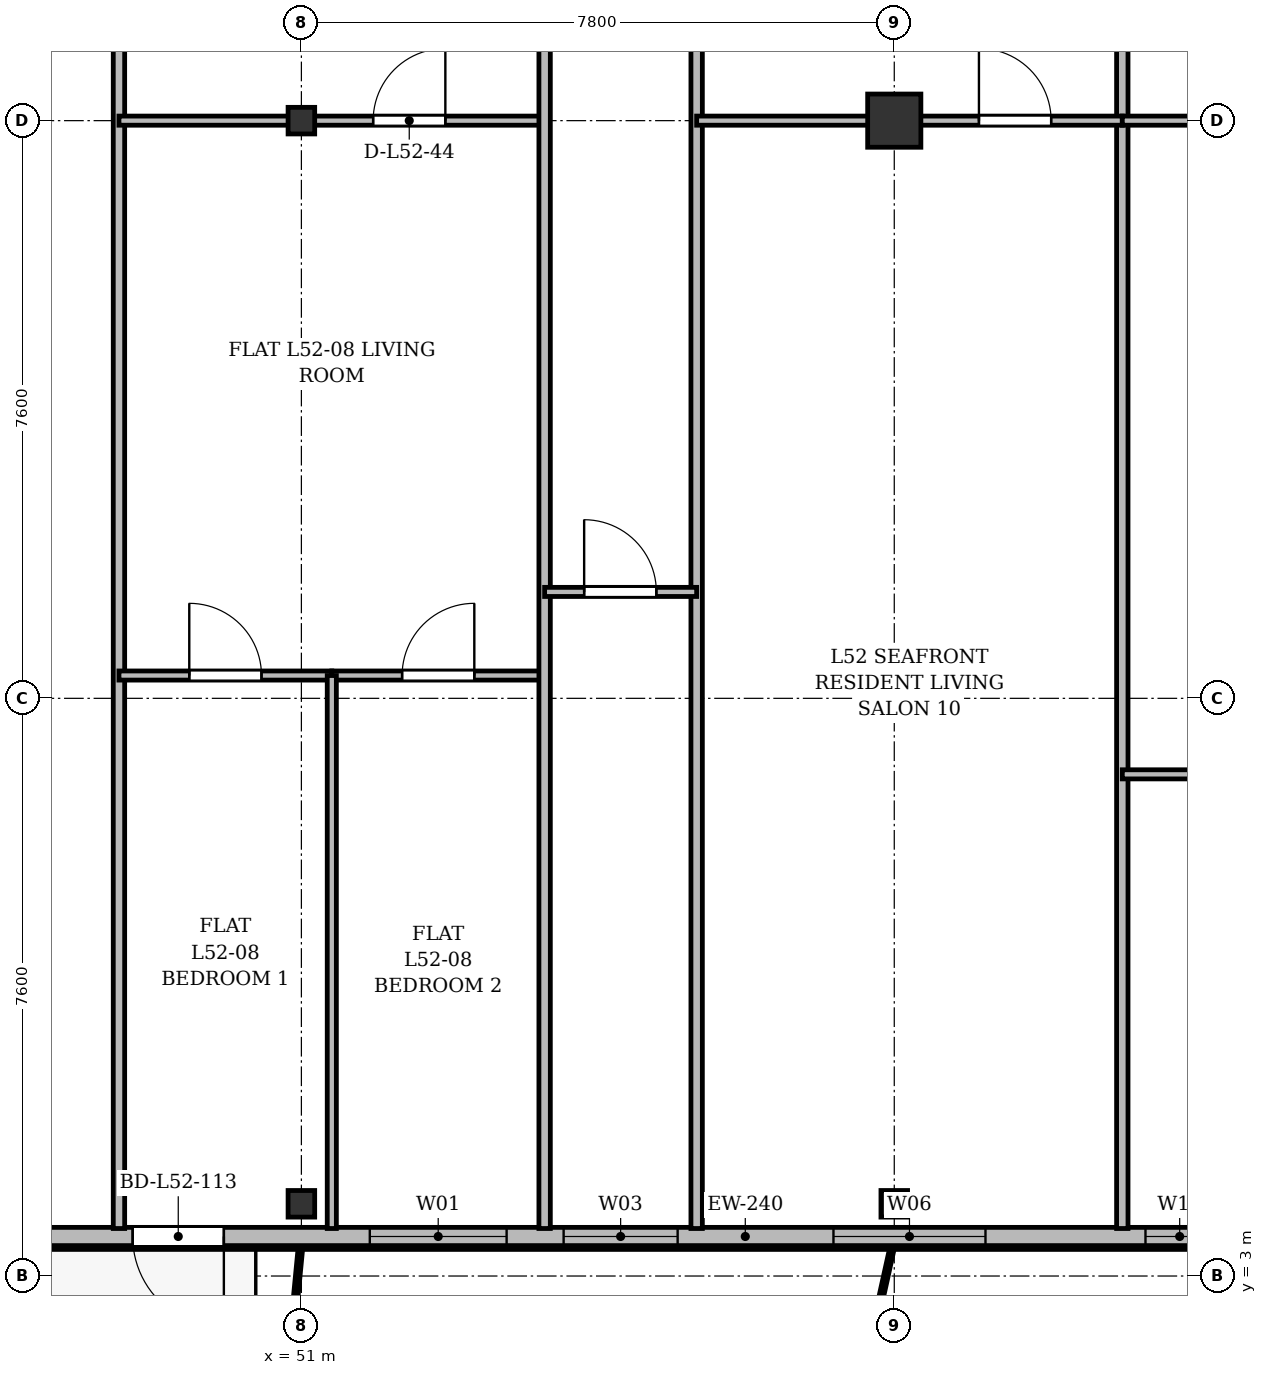
"""IFC4 building model, lengths in metres.
Left out: names, types, materials, properties, quantities, classifications, styles, units other than length and angle.
Written with IfcOpenShell. Run it as: python <this file> out.ifc"""

import sys

from ifc_helpers import new_model, si_unit, direction, frame, frame_2d, origin, origin_2d, place, context, subcontext, project, spatial, rectangle, i_section, extrude, source, transform, mapped, element, fill, save


model = new_model("IFC4")
c1 = context("Model", 3, precision=1e-05, world=origin(), true_north=direction((0.0, 1.0)))
c2 = subcontext(c1, "Body", "Model", "MODEL_VIEW")
j1 = project(units=[si_unit("LENGTHUNIT", "METRE"), si_unit("PLANEANGLEUNIT", "RADIAN")], contexts=[c1])
p1 = place(None, origin())
s1 = spatial("IfcSite", under=j1, at=p1, CompositionType="ELEMENT")
p2 = place(p1, origin())
s2 = spatial("IfcBuilding", under=s1, at=p2, CompositionType="ELEMENT")
p3 = place(p2, frame((0.0, 0.0, 201.3)))
s3 = spatial("IfcBuildingStorey", under=s2, at=p3, CompositionType="ELEMENT", Elevation=201.3)
m1 = source(origin(), c2, "Body", "SweptSolid", [
    extrude(i_section(OverallWidth=0.35, OverallDepth=0.35, WebThickness=0.018, FlangeThickness=0.028, at=origin_2d()), origin(), (0.0, 0.0, 1.0), 3.6),
])
for number, where, z_axis, x_axis in (
    (1, (51.0, 3.95, 0.0), (0.0, 0.0, 1.0), (1.0, 0.0, 0.0)),
    (2, (51.0, 18.2, 0.0), (0.0, 0.0, 1.0), (1.0, 0.0, 0.0)),
    (3, (58.8, 3.95, 0.0), (0.0, 0.0, 1.0), (1.0, 0.0, 0.0)),
):
    element("IfcColumn", number, at=place(p3, frame(where, z_axis=z_axis, x_axis=x_axis)), inside=s3, PredefinedType="COLUMN", context=c2, shape_type="MappedRepresentation", body=[
        mapped(m1, transform((0.0, 0.0, 0.0), x_axis=(1.0, 0.0, 0.0), y_axis=(0.0, 1.0, 0.0), z_axis=(0.0, 0.0, 1.0), scale=1.0)),
    ])
m2 = source(origin(), c2, "Body", "SweptSolid", [
    extrude(rectangle(XDim=0.7, YDim=0.7, at=origin_2d()), origin(), (0.0, 0.0, 1.0), 3.6),
])
p4 = place(p3, frame((58.8, 18.2, 0.0), z_axis=(0.0, 0.0, 1.0), x_axis=(1.0, 0.0, 0.0)))
e4 = element("IfcColumn", 4, at=p4, inside=s3, PredefinedType="COLUMN", context=c2, shape_type="MappedRepresentation", body=[
    mapped(m2, transform((0.0, 0.0, 0.0), x_axis=(1.0, 0.0, 0.0), y_axis=(0.0, 1.0, 0.0), z_axis=(0.0, 0.0, 1.0), scale=1.0)),
])
p5 = place(p3, frame((63.4, 3.52, 0.0), z_axis=(0.0, 0.0, 1.0), x_axis=(-1.0, 0.0, 0.0)))
e5 = element("IfcWall", 5, at=p5, inside=s3, PredefinedType="SOLIDWALL", context=c2, shape_type="SweptSolid", body=[
    extrude(rectangle(XDim=19.6, YDim=0.24, at=frame_2d((9.8, 0.0))), origin(), (0.0, 0.0, 1.0), 3.22),
])
p6 = place(p5, frame((0.395, 0.0, 0.9)))
e6 = element("IfcOpeningElement", 6, at=p6, cuts=e5, PredefinedType="OPENING", context=c2, shape_type="SweptSolid", body=[
    extrude(rectangle(XDim=0.9, YDim=1.65, at=frame_2d((0.45, 0.825))), frame((0.0, 0.13, 0.0), z_axis=(0.0, -1.0, 0.0), x_axis=(1.0, 0.0, 0.0)), (0.0, 0.0, 1.0), 0.26),
])
p7 = place(p5, frame((3.4, 0.0, 0.9)))
e7 = element("IfcOpeningElement", 7, at=p7, cuts=e5, PredefinedType="OPENING", context=c2, shape_type="SweptSolid", body=[
    extrude(rectangle(XDim=2.0, YDim=1.95, at=frame_2d((1.0, 0.975))), frame((0.0, 0.13, 0.0), z_axis=(0.0, -1.0, 0.0), x_axis=(1.0, 0.0, 0.0)), (0.0, 0.0, 1.0), 0.26),
])
p8 = place(p5, frame((7.45, 0.0, 0.9)))
e8 = element("IfcOpeningElement", 8, at=p8, cuts=e5, PredefinedType="OPENING", context=c2, shape_type="SweptSolid", body=[
    extrude(rectangle(XDim=1.5, YDim=1.75, at=frame_2d((0.75, 0.875))), frame((0.0, 0.13, 0.0), z_axis=(0.0, -1.0, 0.0), x_axis=(1.0, 0.0, 0.0)), (0.0, 0.0, 1.0), 0.26),
])
p9 = place(p5, frame((9.7, 0.0, 0.9)))
e9 = element("IfcOpeningElement", 9, at=p9, cuts=e5, PredefinedType="OPENING", context=c2, shape_type="SweptSolid", body=[
    extrude(rectangle(XDim=1.8, YDim=1.8, at=frame_2d((0.9, 0.9))), frame((0.0, 0.13, 0.0), z_axis=(0.0, -1.0, 0.0), x_axis=(1.0, 0.0, 0.0)), (0.0, 0.0, 1.0), 0.26),
])
p10 = place(p5, frame((13.42, 0.0, 0.0)))
e10 = element("IfcOpeningElement", 10, at=p10, cuts=e5, PredefinedType="OPENING", context=c2, shape_type="SweptSolid", body=[
    extrude(rectangle(XDim=1.2, YDim=2.2, at=frame_2d((0.6, 1.1))), frame((0.0, 0.13, 0.0), z_axis=(0.0, -1.0, 0.0), x_axis=(1.0, 0.0, 0.0)), (0.0, 0.0, 1.0), 0.26),
])
p11 = place(p5, frame((16.405, 0.0, 0.9)))
e11 = element("IfcOpeningElement", 11, at=p11, cuts=e5, PredefinedType="OPENING", context=c2, shape_type="SweptSolid", body=[
    extrude(rectangle(XDim=1.5, YDim=1.75, at=frame_2d((0.75, 0.875))), frame((0.0, 0.13, 0.0), z_axis=(0.0, -1.0, 0.0), x_axis=(1.0, 0.0, 0.0)), (0.0, 0.0, 1.0), 0.26),
])
for number, where, z_axis, x_axis in (
    (12, (48.6, 3.625, 0.0), (0.0, 0.0, 1.0), (0.0, 1.0, 0.0)),
    (13, (61.8, 3.625, 0.0), (0.0, 0.0, 1.0), (0.0, 1.0, 0.0)),
):
    element("IfcWall", number, at=place(p3, frame(where, z_axis=z_axis, x_axis=x_axis)), inside=s3, PredefinedType="PARTITIONING", context=c2, shape_type="SweptSolid", body=[
        extrude(rectangle(XDim=27.175, YDim=0.15, at=frame_2d((13.587, 0.0))), origin(), (0.0, 0.0, 1.0), 2.77),
    ])
p12 = place(p3, frame((48.6, 18.2, 0.0), z_axis=(0.0, 0.0, 1.0), x_axis=(1.0, 0.0, 0.0)))
e14 = element("IfcWall", 14, at=p12, inside=s3, PredefinedType="PARTITIONING", context=c2, shape_type="SweptSolid", body=[
    extrude(rectangle(XDim=5.6, YDim=0.12, at=frame_2d((2.8, 0.0))), origin(), (0.0, 0.0, 1.0), 2.77),
])
p13 = place(p12, frame((3.344, 0.0, 0.0)))
e15 = element("IfcOpeningElement", 15, at=p13, cuts=e14, PredefinedType="OPENING", context=c2, shape_type="SweptSolid", body=[
    extrude(rectangle(XDim=0.95, YDim=2.15, at=frame_2d((0.475, 1.075))), frame((0.0, 0.07, 0.0), z_axis=(0.0, -1.0, 0.0), x_axis=(1.0, 0.0, 0.0)), (0.0, 0.0, 1.0), 0.14),
])
p14 = place(p3, frame((48.6, 10.9, 0.0), z_axis=(0.0, 0.0, 1.0), x_axis=(1.0, 0.0, 0.0)))
e16 = element("IfcWall", 16, at=p14, inside=s3, PredefinedType="PARTITIONING", context=c2, shape_type="SweptSolid", body=[
    extrude(rectangle(XDim=2.8, YDim=0.12, at=frame_2d((1.4, 0.0))), origin(), (0.0, 0.0, 1.0), 2.72),
])
p15 = place(p14, frame((0.925, 0.0, 0.0)))
e17 = element("IfcOpeningElement", 17, at=p15, cuts=e16, PredefinedType="OPENING", context=c2, shape_type="SweptSolid", body=[
    extrude(rectangle(XDim=0.95, YDim=2.15, at=frame_2d((0.475, 1.075))), frame((0.0, 0.07, 0.0), z_axis=(0.0, -1.0, 0.0), x_axis=(1.0, 0.0, 0.0)), (0.0, 0.0, 1.0), 0.14),
])
p16 = place(p3, frame((51.4, 10.9, 0.0), z_axis=(0.0, 0.0, 1.0), x_axis=(1.0, 0.0, 0.0)))
e18 = element("IfcWall", 18, at=p16, inside=s3, PredefinedType="PARTITIONING", context=c2, shape_type="SweptSolid", body=[
    extrude(rectangle(XDim=2.8, YDim=0.12, at=frame_2d((1.4, 0.0))), origin(), (0.0, 0.0, 1.0), 2.92),
])
p17 = place(p16, frame((0.925, 0.0, 0.0)))
e19 = element("IfcOpeningElement", 19, at=p17, cuts=e18, PredefinedType="OPENING", context=c2, shape_type="SweptSolid", body=[
    extrude(rectangle(XDim=0.95, YDim=2.15, at=frame_2d((0.475, 1.075))), frame((0.0, 0.07, 0.0), z_axis=(0.0, -1.0, 0.0), x_axis=(1.0, 0.0, 0.0)), (0.0, 0.0, 1.0), 0.14),
])
p18 = place(p3, frame((51.4, 3.625, 0.0), z_axis=(0.0, 0.0, 1.0), x_axis=(0.0, 1.0, 0.0)))
e20 = element("IfcWall", 20, at=p18, inside=s3, PredefinedType="PARTITIONING", context=c2, shape_type="SweptSolid", body=[
    extrude(rectangle(XDim=7.275, YDim=0.12, at=frame_2d((3.637, 0.0))), origin(), (0.0, 0.0, 1.0), 2.77),
])
for number, where, z_axis, x_axis in (
    (21, (54.2, 3.625, 0.0), (0.0, 0.0, 1.0), (0.0, 1.0, 0.0)),
    (22, (56.2, 3.625, 0.0), (0.0, 0.0, 1.0), (0.0, 1.0, 0.0)),
):
    element("IfcWall", number, at=place(p3, frame(where, z_axis=z_axis, x_axis=x_axis)), inside=s3, PredefinedType="PARTITIONING", context=c2, shape_type="SweptSolid", body=[
        extrude(rectangle(XDim=27.175, YDim=0.15, at=frame_2d((13.587, 0.0))), origin(), (0.0, 0.0, 1.0), 2.77),
    ])
p19 = place(p3, frame((54.2, 12.0, 0.0), z_axis=(0.0, 0.0, 1.0), x_axis=(1.0, 0.0, 0.0)))
e23 = element("IfcWall", 23, at=p19, inside=s3, PredefinedType="PARTITIONING", context=c2, shape_type="SweptSolid", body=[
    extrude(rectangle(XDim=2.0, YDim=0.12, at=frame_2d((1.0, 0.0))), origin(), (0.0, 0.0, 1.0), 3.22),
])
p20 = place(p19, frame((0.52, 0.0, 0.0)))
e24 = element("IfcOpeningElement", 24, at=p20, cuts=e23, PredefinedType="OPENING", context=c2, shape_type="SweptSolid", body=[
    extrude(rectangle(XDim=0.95, YDim=2.15, at=frame_2d((0.475, 1.075))), frame((0.0, 0.07, 0.0), z_axis=(0.0, -1.0, 0.0), x_axis=(1.0, 0.0, 0.0)), (0.0, 0.0, 1.0), 0.14),
])
p21 = place(p3, frame((56.2, 18.2, 0.0), z_axis=(0.0, 0.0, 1.0), x_axis=(1.0, 0.0, 0.0)))
e25 = element("IfcWall", 25, at=p21, inside=s3, PredefinedType="PARTITIONING", context=c2, shape_type="SweptSolid", body=[
    extrude(rectangle(XDim=5.6, YDim=0.12, at=frame_2d((2.8, 0.0))), origin(), (0.0, 0.0, 1.0), 2.77),
])
p22 = place(p21, frame((3.714, 0.0, 0.0)))
e26 = element("IfcOpeningElement", 26, at=p22, cuts=e25, PredefinedType="OPENING", context=c2, shape_type="SweptSolid", body=[
    extrude(rectangle(XDim=0.95, YDim=2.15, at=frame_2d((0.475, 1.075))), frame((0.0, 0.07, 0.0), z_axis=(0.0, -1.0, 0.0), x_axis=(1.0, 0.0, 0.0)), (0.0, 0.0, 1.0), 0.14),
])
p23 = place(p3, frame((61.8, 18.2, 0.0), z_axis=(0.0, 0.0, 1.0), x_axis=(1.0, 0.0, 0.0)))
e27 = element("IfcWall", 27, at=p23, inside=s3, PredefinedType="PARTITIONING", context=c2, shape_type="SweptSolid", body=[
    extrude(rectangle(XDim=4.36, YDim=0.12, at=frame_2d((2.18, 0.0))), origin(), (0.0, 0.0, 1.0), 2.77),
])
p24 = place(p23, frame((1.705, 0.0, 0.0)))
e28 = element("IfcOpeningElement", 28, at=p24, cuts=e27, PredefinedType="OPENING", context=c2, shape_type="SweptSolid", body=[
    extrude(rectangle(XDim=0.95, YDim=2.15, at=frame_2d((0.475, 1.075))), frame((0.0, 0.07, 0.0), z_axis=(0.0, -1.0, 0.0), x_axis=(1.0, 0.0, 0.0)), (0.0, 0.0, 1.0), 0.14),
])
p25 = place(p3, frame((61.8, 9.6, 0.0), z_axis=(0.0, 0.0, 1.0), x_axis=(1.0, 0.0, 0.0)))
e29 = element("IfcWall", 29, at=p25, inside=s3, PredefinedType="PARTITIONING", context=c2, shape_type="SweptSolid", body=[
    extrude(rectangle(XDim=4.36, YDim=0.12, at=frame_2d((2.18, 0.0))), origin(), (0.0, 0.0, 1.0), 2.72),
])
p26 = place(p25, frame((1.705, 0.0, 0.0)))
e30 = element("IfcOpeningElement", 30, at=p26, cuts=e29, PredefinedType="OPENING", context=c2, shape_type="SweptSolid", body=[
    extrude(rectangle(XDim=0.95, YDim=2.15, at=frame_2d((0.475, 1.075))), frame((0.0, 0.07, 0.0), z_axis=(0.0, -1.0, 0.0), x_axis=(1.0, 0.0, 0.0)), (0.0, 0.0, 1.0), 0.14),
])
m3 = source(origin(), c2, "Body", "SweptSolid", [
    extrude(rectangle(XDim=0.9, YDim=1.65, at=frame_2d((0.45, 0.825))), frame((0.0, 0.03, 0.0), z_axis=(0.0, -1.0, 0.0), x_axis=(1.0, 0.0, 0.0)), (0.0, 0.0, 1.0), 0.06),
])
p27 = place(p6, origin())
e31 = element("IfcWindow", 31, at=p27, inside=s3, PartitioningType="SINGLE_PANEL", PredefinedType="WINDOW", context=c2, shape_type="MappedRepresentation", body=[
    mapped(m3, transform((0.0, 0.0, 0.0), x_axis=(1.0, 0.0, 0.0), y_axis=(0.0, 1.0, 0.0), z_axis=(0.0, 0.0, 1.0), scale=1.0)),
])
fill(e6, e31)
m4 = source(origin(), c2, "Body", "SweptSolid", [
    extrude(rectangle(XDim=2.0, YDim=1.95, at=frame_2d((1.0, 0.975))), frame((0.0, 0.03, 0.0), z_axis=(0.0, -1.0, 0.0), x_axis=(1.0, 0.0, 0.0)), (0.0, 0.0, 1.0), 0.06),
])
p28 = place(p7, origin())
e32 = element("IfcWindow", 32, at=p28, inside=s3, PartitioningType="SINGLE_PANEL", PredefinedType="WINDOW", context=c2, shape_type="MappedRepresentation", body=[
    mapped(m4, transform((0.0, 0.0, 0.0), x_axis=(1.0, 0.0, 0.0), y_axis=(0.0, 1.0, 0.0), z_axis=(0.0, 0.0, 1.0), scale=1.0)),
])
fill(e7, e32)
m5 = source(origin(), c2, "Body", "SweptSolid", [
    extrude(rectangle(XDim=1.5, YDim=1.75, at=frame_2d((0.75, 0.875))), frame((0.0, 0.03, 0.0), z_axis=(0.0, -1.0, 0.0), x_axis=(1.0, 0.0, 0.0)), (0.0, 0.0, 1.0), 0.06),
])
p29 = place(p8, origin())
e33 = element("IfcWindow", 33, at=p29, inside=s3, PartitioningType="SINGLE_PANEL", PredefinedType="WINDOW", context=c2, shape_type="MappedRepresentation", body=[
    mapped(m5, transform((0.0, 0.0, 0.0), x_axis=(1.0, 0.0, 0.0), y_axis=(0.0, 1.0, 0.0), z_axis=(0.0, 0.0, 1.0), scale=1.0)),
])
fill(e8, e33)
m6 = source(origin(), c2, "Body", "SweptSolid", [
    extrude(rectangle(XDim=1.8, YDim=1.8, at=frame_2d((0.9, 0.9))), frame((0.0, 0.03, 0.0), z_axis=(0.0, -1.0, 0.0), x_axis=(1.0, 0.0, 0.0)), (0.0, 0.0, 1.0), 0.06),
])
p30 = place(p9, origin())
e34 = element("IfcWindow", 34, at=p30, inside=s3, PartitioningType="SINGLE_PANEL", PredefinedType="WINDOW", context=c2, shape_type="MappedRepresentation", body=[
    mapped(m6, transform((0.0, 0.0, 0.0), x_axis=(1.0, 0.0, 0.0), y_axis=(0.0, 1.0, 0.0), z_axis=(0.0, 0.0, 1.0), scale=1.0)),
])
fill(e9, e34)
m7 = source(origin(), c2, "Body", "SweptSolid", [
    extrude(rectangle(XDim=1.2, YDim=2.2, at=frame_2d((0.6, 1.1))), frame((0.0, 0.025, 0.0), z_axis=(0.0, -1.0, 0.0), x_axis=(1.0, 0.0, 0.0)), (0.0, 0.0, 1.0), 0.05),
])
p31 = place(p10, origin())
e35 = element("IfcDoor", 35, at=p31, inside=s3, OperationType="SINGLE_SWING_LEFT", PredefinedType="DOOR", context=c2, shape_type="MappedRepresentation", body=[
    mapped(m7, transform((0.0, 0.0, 0.0), x_axis=(1.0, 0.0, 0.0), y_axis=(0.0, 1.0, 0.0), z_axis=(0.0, 0.0, 1.0), scale=1.0)),
])
fill(e10, e35)
m8 = source(origin(), c2, "Body", "SweptSolid", [
    extrude(rectangle(XDim=0.95, YDim=2.15, at=frame_2d((0.475, 1.075))), frame((0.0, 0.025, 0.0), z_axis=(0.0, -1.0, 0.0), x_axis=(1.0, 0.0, 0.0)), (0.0, 0.0, 1.0), 0.05),
])
p32 = place(p13, origin())
e36 = element("IfcDoor", 36, at=p32, inside=s3, OperationType="SINGLE_SWING_RIGHT", PredefinedType="DOOR", context=c2, shape_type="MappedRepresentation", body=[
    mapped(m8, transform((0.0, 0.0, 0.0), x_axis=(1.0, 0.0, 0.0), y_axis=(0.0, 1.0, 0.0), z_axis=(0.0, 0.0, 1.0), scale=1.0)),
])
fill(e15, e36)
p33 = place(p15, origin())
e37 = element("IfcDoor", 37, at=p33, inside=s3, OperationType="SINGLE_SWING_LEFT", PredefinedType="DOOR", context=c2, shape_type="MappedRepresentation", body=[
    mapped(m8, transform((0.0, 0.0, 0.0), x_axis=(1.0, 0.0, 0.0), y_axis=(0.0, 1.0, 0.0), z_axis=(0.0, 0.0, 1.0), scale=1.0)),
])
fill(e17, e37)
p34 = place(p17, origin())
e38 = element("IfcDoor", 38, at=p34, inside=s3, OperationType="SINGLE_SWING_RIGHT", PredefinedType="DOOR", context=c2, shape_type="MappedRepresentation", body=[
    mapped(m8, transform((0.0, 0.0, 0.0), x_axis=(1.0, 0.0, 0.0), y_axis=(0.0, 1.0, 0.0), z_axis=(0.0, 0.0, 1.0), scale=1.0)),
])
fill(e19, e38)
p35 = place(p20, origin())
e39 = element("IfcDoor", 39, at=p35, inside=s3, OperationType="SINGLE_SWING_LEFT", PredefinedType="DOOR", context=c2, shape_type="MappedRepresentation", body=[
    mapped(m8, transform((0.0, 0.0, 0.0), x_axis=(1.0, 0.0, 0.0), y_axis=(0.0, 1.0, 0.0), z_axis=(0.0, 0.0, 1.0), scale=1.0)),
])
fill(e24, e39)
p36 = place(p22, origin())
e40 = element("IfcDoor", 40, at=p36, inside=s3, OperationType="SINGLE_SWING_LEFT", PredefinedType="DOOR", context=c2, shape_type="MappedRepresentation", body=[
    mapped(m8, transform((0.0, 0.0, 0.0), x_axis=(1.0, 0.0, 0.0), y_axis=(0.0, 1.0, 0.0), z_axis=(0.0, 0.0, 1.0), scale=1.0)),
])
fill(e26, e40)
save(model, sys.argv[1])
